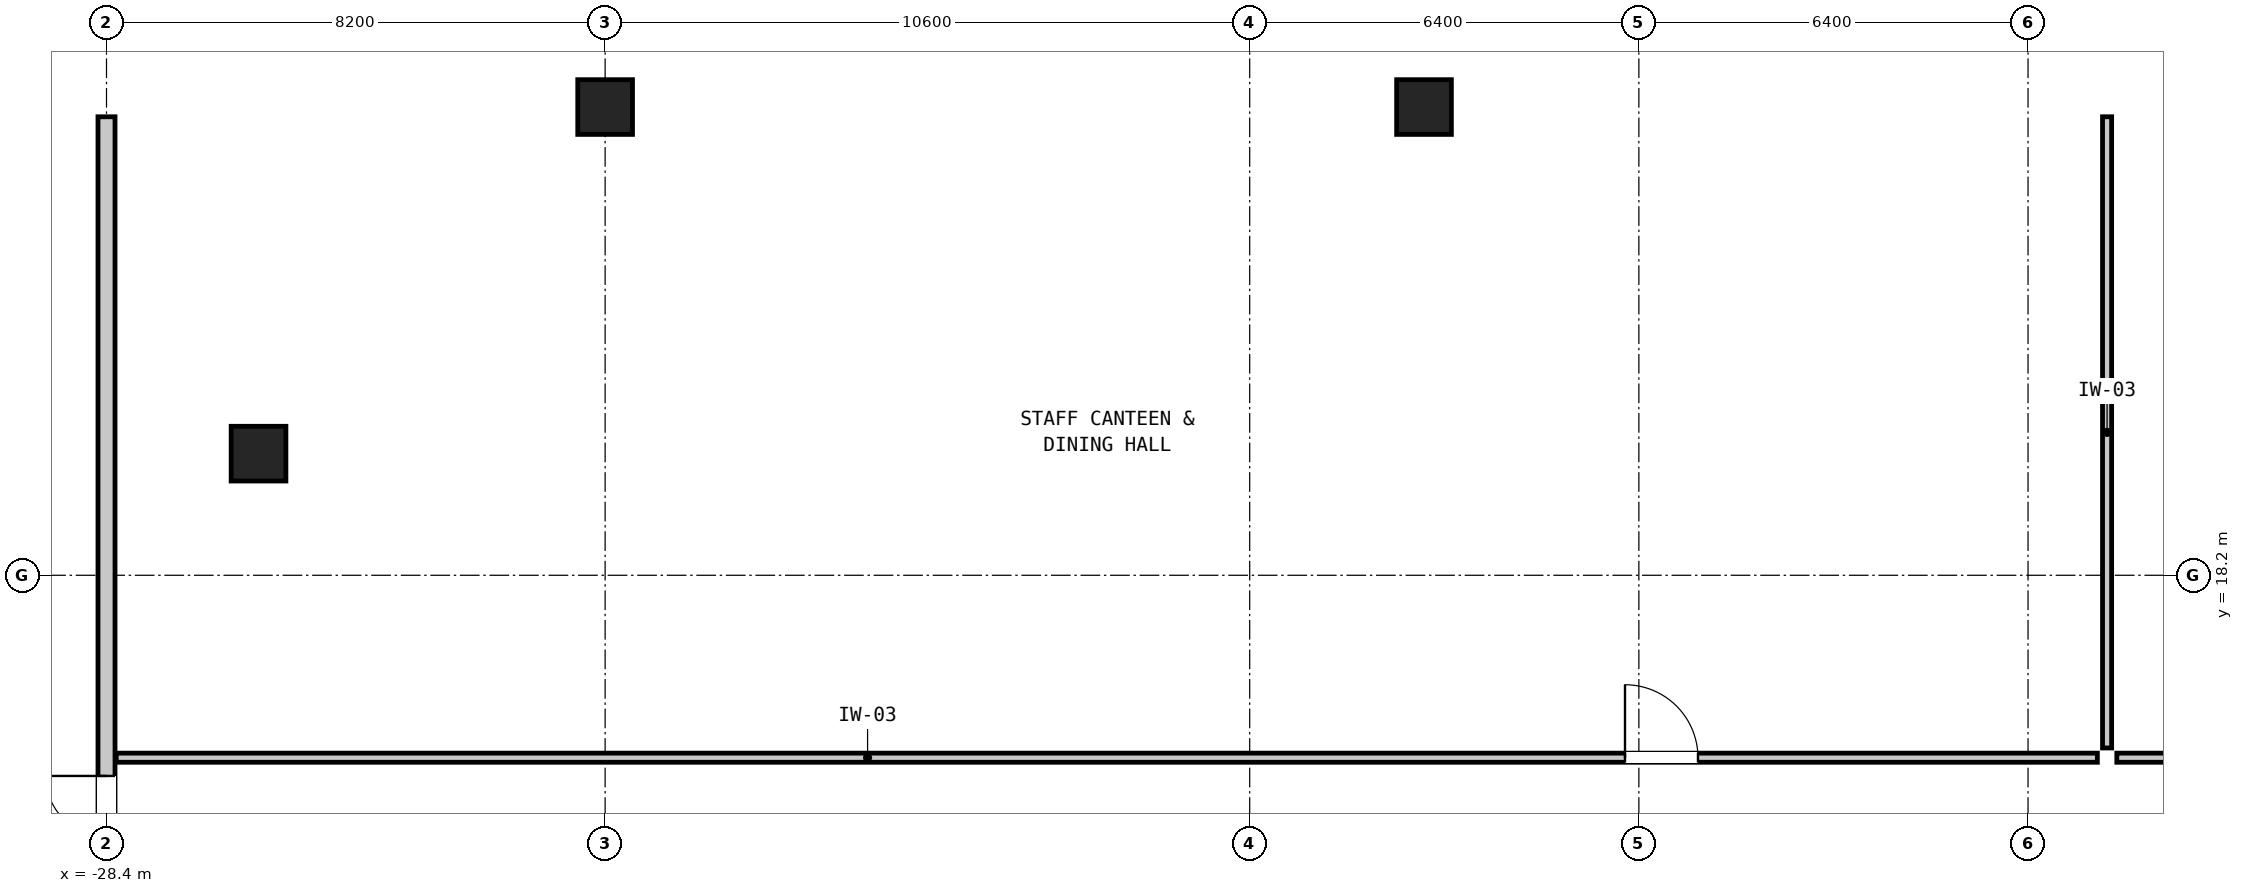
"""IFC4 building model, lengths in metres.
Left out: names, types, materials, properties, quantities, classifications, styles, units other than length and angle.
Written with IfcOpenShell. Run it as: python <this file> out.ifc"""

import sys

from ifc_helpers import new_model, si_unit, direction, frame, frame_2d, origin, origin_2d, place, context, subcontext, project, spatial, rectangle, hollow_rectangle, extrude, element, fill, save


model = new_model("IFC4")
c1 = context("Model", 3, precision=1e-05, world=origin(), true_north=direction((0.0, 1.0)))
c2 = subcontext(c1, "Body", "Model", "MODEL_VIEW")
j1 = project(units=[si_unit("LENGTHUNIT", "METRE"), si_unit("PLANEANGLEUNIT", "RADIAN")], contexts=[c1])
p1 = place(None, origin())
s1 = spatial("IfcSite", under=j1, at=p1, CompositionType="ELEMENT")
p2 = place(p1, origin())
s2 = spatial("IfcBuilding", under=s1, at=p2, CompositionType="ELEMENT")
p3 = place(p2, frame((0.0, 0.0, 17.7)))
s3 = spatial("IfcBuildingStorey", under=s2, at=p3, CompositionType="ELEMENT", Elevation=17.7)
for number, where, z_axis, x_axis in (
    (1, (-6.733, 25.9, 0.0), (0.0, 0.0, 1.0), (1.0, 0.0, 0.0)),
    (2, (-20.2, 25.9, 0.0), (0.0, 0.0, 1.0), (1.0, 0.0, 0.0)),
    (3, (-25.9, 20.2, 0.0), (0.0, 0.0, 1.0), (0.0, 1.0, 0.0)),
):
    element("IfcColumn", number, at=place(p3, frame(where, z_axis=z_axis, x_axis=x_axis)), inside=s3, PredefinedType="COLUMN", context=c2, shape_type="SweptSolid", body=[
        extrude(hollow_rectangle(XDim=0.9, YDim=0.9, WallThickness=0.055, at=origin_2d()), origin(), (0.0, 0.0, 1.0), 4.2),
    ])
p4 = place(p3, frame((-28.4, -25.74, 0.0), z_axis=(0.0, 0.0, 1.0), x_axis=(0.0, 1.0, 0.0)))
e4 = element("IfcWall", 4, at=p4, inside=s3, PredefinedType="MOVABLE", context=c2, shape_type="SweptSolid", body=[
    extrude(rectangle(XDim=51.48, YDim=0.28, at=frame_2d((25.74, 0.0))), origin(), (0.0, 0.0, 1.0), 3.82),
])
p5 = place(p4, frame((11.149, 0.0, 0.0)))
e5 = element("IfcOpeningElement", 5, at=p5, cuts=e4, PredefinedType="OPENING", context=c2, shape_type="SweptSolid", body=[
    extrude(rectangle(XDim=2.0, YDim=2.14, at=frame_2d((1.0, 1.07))), frame((0.0, 0.152, 0.0), z_axis=(0.0, -1.0, 0.0), x_axis=(1.0, 0.0, 0.0)), (0.0, 0.0, 1.0), 0.304),
])
p6 = place(p4, frame((38.64, 0.0, 0.0)))
e6 = element("IfcOpeningElement", 6, at=p6, cuts=e4, PredefinedType="OPENING", context=c2, shape_type="SweptSolid", body=[
    extrude(rectangle(XDim=2.0, YDim=2.14, at=frame_2d((1.0, 1.07))), frame((0.0, 0.152, 0.0), z_axis=(0.0, -1.0, 0.0), x_axis=(1.0, 0.0, 0.0)), (0.0, 0.0, 1.0), 0.304),
])
p7 = place(p3, frame((-28.24, 15.2, 0.0), z_axis=(0.0, 0.0, 1.0), x_axis=(1.0, 0.0, 0.0)))
e7 = element("IfcWall", 7, at=p7, inside=s3, PredefinedType="PARTITIONING", context=c2, shape_type="SweptSolid", body=[
    extrude(rectangle(XDim=32.58, YDim=0.15, at=frame_2d((16.29, 0.0))), origin(), (0.0, 0.0, 1.0), 3.82),
])
p8 = place(p7, frame((24.812, 0.0, 0.0)))
e8 = element("IfcOpeningElement", 8, at=p8, cuts=e7, PredefinedType="OPENING", context=c2, shape_type="SweptSolid", body=[
    extrude(rectangle(XDim=1.2, YDim=2.1, at=frame_2d((0.6, 1.05))), frame((0.0, 0.087, 0.0), z_axis=(0.0, -1.0, 0.0), x_axis=(1.0, 0.0, 0.0)), (0.0, 0.0, 1.0), 0.174),
])
p9 = place(p3, frame((4.66, 15.2, 0.0), z_axis=(0.0, 0.0, 1.0), x_axis=(1.0, 0.0, 0.0)))
e9 = element("IfcWall", 9, at=p9, inside=s3, PredefinedType="PARTITIONING", context=c2, shape_type="SweptSolid", body=[
    extrude(rectangle(XDim=15.58, YDim=0.15, at=frame_2d((7.79, 0.0))), origin(), (0.0, 0.0, 1.0), 3.82),
])
p10 = place(p9, frame((3.295, 0.0, 0.0)))
e10 = element("IfcOpeningElement", 10, at=p10, cuts=e9, PredefinedType="OPENING", context=c2, shape_type="SweptSolid", body=[
    extrude(rectangle(XDim=1.2, YDim=2.1, at=frame_2d((0.6, 1.05))), frame((0.0, 0.087, 0.0), z_axis=(0.0, -1.0, 0.0), x_axis=(1.0, 0.0, 0.0)), (0.0, 0.0, 1.0), 0.174),
])
p11 = place(p3, frame((4.5, 15.36, 0.0), z_axis=(0.0, 0.0, 1.0), x_axis=(0.0, 1.0, 0.0)))
e11 = element("IfcWall", 11, at=p11, inside=s3, PredefinedType="PARTITIONING", context=c2, shape_type="SweptSolid", body=[
    extrude(rectangle(XDim=10.38, YDim=0.15, at=frame_2d((5.19, 0.0))), origin(), (0.0, 0.0, 1.0), 3.82),
])
p12 = place(p6, origin())
e12 = element("IfcDoor", 12, at=p12, inside=s3, OperationType="DOUBLE_DOOR_SINGLE_SWING", PredefinedType="DOOR", context=c2, shape_type="SweptSolid", body=[
    extrude(rectangle(XDim=2.0, YDim=2.14, at=frame_2d((1.0, 1.07))), frame((0.0, 0.025, 0.0), z_axis=(0.0, -1.0, 0.0), x_axis=(1.0, 0.0, 0.0)), (0.0, 0.0, 1.0), 0.05),
])
fill(e6, e12)
p13 = place(p8, origin())
e13 = element("IfcDoor", 13, at=p13, inside=s3, OperationType="SINGLE_SWING_LEFT", PredefinedType="DOOR", context=c2, shape_type="SweptSolid", body=[
    extrude(rectangle(XDim=1.2, YDim=2.1, at=frame_2d((0.6, 1.05))), frame((0.0, 0.025, 0.0), z_axis=(0.0, -1.0, 0.0), x_axis=(1.0, 0.0, 0.0)), (0.0, 0.0, 1.0), 0.05),
])
fill(e8, e13)
save(model, sys.argv[1])
